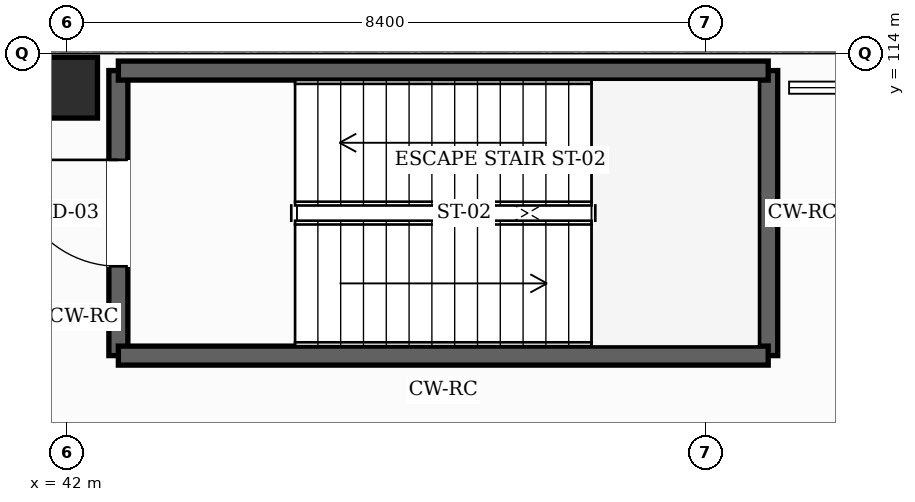
"""IFC4 building model, lengths in metres.
Left out: names, types, materials, properties, quantities, classifications, styles, units other than length and angle.
Written with IfcOpenShell. Run it as: python <this file> out.ifc"""

import sys

from ifc_helpers import new_model, si_unit, direction, frame, frame_2d, origin, origin_2d, place, context, subcontext, project, spatial, rectangle, hollow_rectangle, extrude, element, fill, save


model = new_model("IFC4")
c1 = context("Model", 3, precision=1e-05, world=origin(), true_north=direction((0.0, 1.0)))
c2 = subcontext(c1, "Body", "Model", "MODEL_VIEW")
j1 = project(units=[si_unit("LENGTHUNIT", "METRE"), si_unit("PLANEANGLEUNIT", "RADIAN")], contexts=[c1])
p1 = place(None, origin())
s1 = spatial("IfcSite", under=j1, at=p1, CompositionType="ELEMENT")
p2 = place(p1, origin())
s2 = spatial("IfcBuilding", under=s1, at=p2, CompositionType="ELEMENT")
p3 = place(p2, frame((0.0, 0.0, 10.2)))
s3 = spatial("IfcBuildingStorey", under=s2, at=p3, CompositionType="ELEMENT", Elevation=10.2)
p4 = place(p3, frame((42.0, 113.55, 0.0), z_axis=(0.0, 0.0, 1.0), x_axis=(1.0, 0.0, 0.0)))
e1 = element("IfcColumn", 1, at=p4, inside=s3, PredefinedType="COLUMN", context=c2, shape_type="SweptSolid", body=[
    extrude(hollow_rectangle(XDim=0.8, YDim=0.8, WallThickness=0.032, InnerFilletRadius=0.032, OuterFilletRadius=0.064, at=origin_2d()), origin(), (0.0, 0.0, 1.0), 4.8),
])
p5 = place(p3, frame((42.675, 110.025, 0.0), z_axis=(0.0, 0.0, 1.0), x_axis=(0.0, 1.0, 0.0)))
e2 = element("IfcWall", 2, at=p5, inside=s3, PredefinedType="SHEAR", context=c2, shape_type="SweptSolid", body=[
    extrude(rectangle(XDim=3.75, YDim=0.25, at=frame_2d((1.875, 0.0))), origin(), (0.0, 0.0, 1.0), 4.56),
])
p6 = place(p5, frame((1.175, 0.0, 0.0)))
e3 = element("IfcOpeningElement", 3, at=p6, cuts=e2, PredefinedType="OPENING", context=c2, shape_type="SweptSolid", body=[
    extrude(rectangle(XDim=1.4, YDim=2.25, at=frame_2d((0.7, 1.125))), frame((0.0, 0.135, 0.0), z_axis=(0.0, -1.0, 0.0), x_axis=(1.0, 0.0, 0.0)), (0.0, 0.0, 1.0), 0.27),
])
p7 = place(p3, frame((51.225, 113.775, 0.0), z_axis=(0.0, 0.0, 1.0), x_axis=(0.0, -1.0, 0.0)))
e4 = element("IfcWall", 4, at=p7, inside=s3, PredefinedType="SHEAR", context=c2, shape_type="SweptSolid", body=[
    extrude(rectangle(XDim=3.75, YDim=0.25, at=frame_2d((1.875, 0.0))), origin(), (0.0, 0.0, 1.0), 4.56),
])
for number, where, z_axis, x_axis in (
    (5, (51.225, 110.025, 0.0), (0.0, 0.0, 1.0), (-1.0, 0.0, 0.0)),
    (6, (42.675, 113.775, 0.0), (0.0, 0.0, 1.0), (1.0, 0.0, 0.0)),
):
    element("IfcWall", number, at=place(p3, frame(where, z_axis=z_axis, x_axis=x_axis)), inside=s3, PredefinedType="SHEAR", context=c2, shape_type="SweptSolid", body=[
        extrude(rectangle(XDim=8.55, YDim=0.25, at=frame_2d((4.275, 0.0))), origin(), (0.0, 0.0, 1.0), 4.56),
    ])
p8 = place(p6, origin())
e7 = element("IfcDoor", 7, at=p8, inside=s3, OperationType="SINGLE_SWING_RIGHT", PredefinedType="DOOR", context=c2, shape_type="SweptSolid", body=[
    extrude(rectangle(XDim=1.4, YDim=2.25, at=frame_2d((0.7, 1.125))), frame((0.0, 0.025, 0.0), z_axis=(0.0, -1.0, 0.0), x_axis=(1.0, 0.0, 0.0)), (0.0, 0.0, 1.0), 0.05),
])
fill(e3, e7)
save(model, sys.argv[1])
